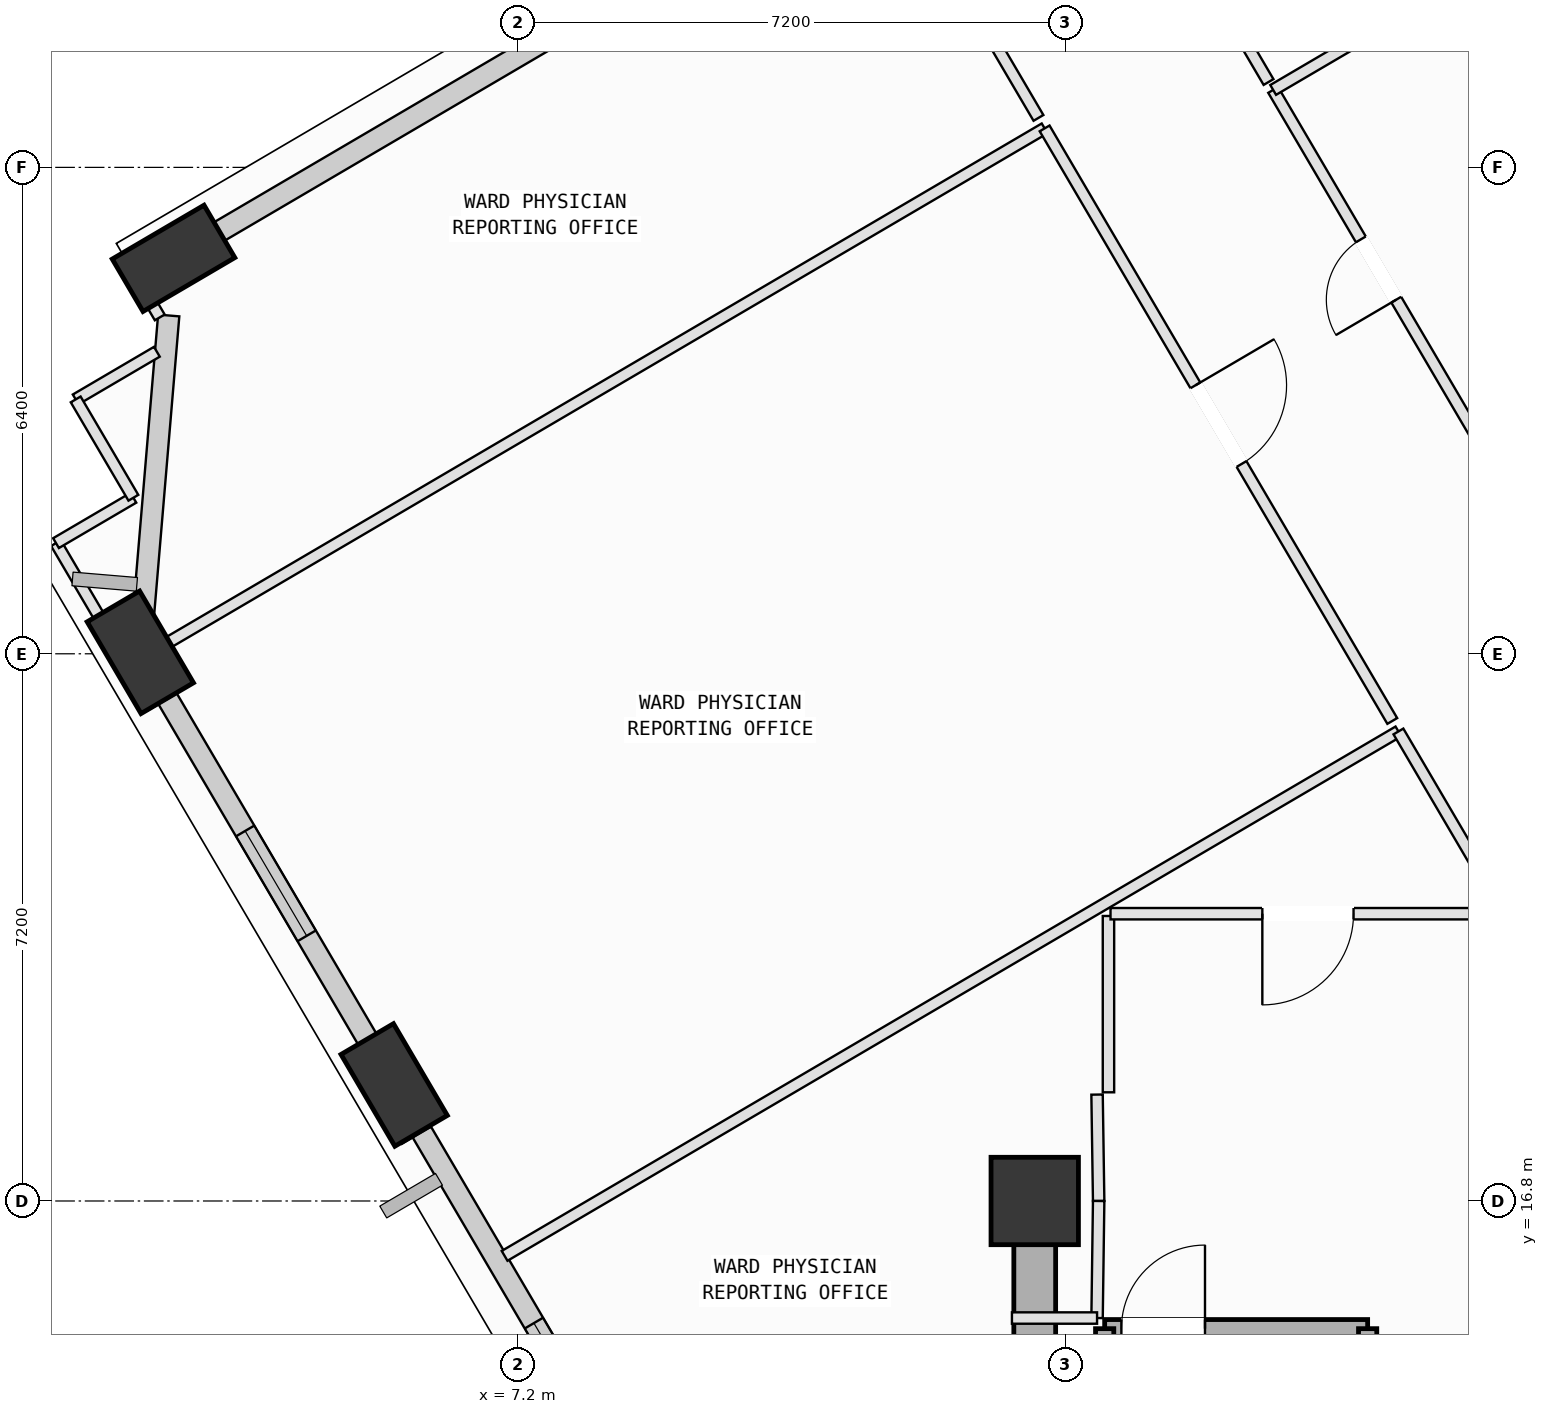
"""IFC4 building model, lengths in metres.
Left out: names, types, materials, properties, quantities, classifications, styles, units other than length and angle.
Written with IfcOpenShell. Run it as: python <this file> out.ifc"""

import sys

from ifc_helpers import new_model, si_unit, direction, frame, frame_2d, origin, origin_2d, place, context, subcontext, project, spatial, rectangle, extrude, element, fill, save


model = new_model("IFC4")
c1 = context("Model", 3, precision=1e-05, world=origin(), true_north=direction((0.0, 1.0)))
c2 = subcontext(c1, "Body", "Model", "MODEL_VIEW")
j1 = project(units=[si_unit("LENGTHUNIT", "METRE"), si_unit("PLANEANGLEUNIT", "RADIAN")], contexts=[c1])
p1 = place(None, origin())
s1 = spatial("IfcSite", under=j1, at=p1, CompositionType="ELEMENT")
p2 = place(p1, origin())
s2 = spatial("IfcBuilding", under=s1, at=p2, CompositionType="ELEMENT")
p3 = place(p2, frame((0.0, 0.0, 153.8)))
s3 = spatial("IfcBuildingStorey", under=s2, at=p3, CompositionType="ELEMENT", Elevation=153.8)
p4 = place(p3, frame((14.0, 16.8, 0.0), z_axis=(0.0, 0.0, 1.0), x_axis=(1.0, 0.0, 0.0)))
e1 = element("IfcColumn", 1, at=p4, inside=s3, PredefinedType="COLUMN", context=c2, shape_type="SweptSolid", body=[
    extrude(rectangle(XDim=1.15, YDim=1.15, at=origin_2d()), origin(), (0.0, 0.0, 1.0), 4.0),
])
p5 = place(p3, frame((2.669, 29.203, 0.002), z_axis=(-0.017085014726, -0.127289418228, 0.991718461197), x_axis=(0.921607394324, 0.382643519361, 0.064990367119)))
e2 = element("IfcColumn", 2, at=p5, inside=s3, PredefinedType="COLUMN", context=c2, shape_type="SweptSolid", body=[
    extrude(rectangle(XDim=1.4, YDim=0.8, at=origin_2d()), origin(), (0.0, 0.0, 1.0), 4.03),
])
p6 = place(p3, frame((2.232, 24.019, 0.002), z_axis=(0.004301232882, -0.128915824962, 0.991646211847), x_axis=(-0.534273545807, 0.837958489173, 0.111253533308)))
e3 = element("IfcColumn", 3, at=p6, inside=s3, PredefinedType="COLUMN", context=c2, shape_type="SweptSolid", body=[
    extrude(rectangle(XDim=1.4, YDim=0.8, at=origin_2d()), origin(), (0.0, 0.0, 1.0), 4.03),
])
p7 = place(p3, frame((5.572, 18.327, 0.002), z_axis=(0.027600932287, -0.115135317539, 0.992966287037), x_axis=(-0.69174719103, 0.714882822887, 0.102119406791)))
e4 = element("IfcColumn", 4, at=p7, inside=s3, PredefinedType="COLUMN", context=c2, shape_type="SweptSolid", body=[
    extrude(rectangle(XDim=1.4, YDim=0.8, at=origin_2d()), origin(), (0.0, 0.0, 1.0), 4.025),
])
p8 = place(p3, frame((2.922, 29.352, 0.0), z_axis=(0.0, 0.0, 1.0), x_axis=(0.862524124062, 0.506015943831, 0.0)))
e5 = element("IfcWall", 5, at=p8, inside=s3, PredefinedType="SOLIDWALL", context=c2, shape_type="SweptSolid", body=[
    extrude(rectangle(XDim=7.27, YDim=0.28, at=frame_2d((3.635, 0.0))), origin(), (0.0, 0.0, 1.0), 3.165),
])
p9 = place(p3, frame((2.252, 24.256, 0.0), z_axis=(0.0, 0.0, 1.0), x_axis=(0.083957153569, 0.996469365492, 0.0)))
e6 = element("IfcWall", 6, at=p9, inside=s3, PredefinedType="SOLIDWALL", context=c2, shape_type="SweptSolid", body=[
    extrude(rectangle(XDim=4.211, YDim=0.28, at=frame_2d((2.105, 0.0))), origin(), (0.0, 0.0, 1.0), 3.165),
])
p10 = place(p3, frame((5.439, 18.554, 0.0), z_axis=(0.0, 0.0, 1.0), x_axis=(-0.506043442112, 0.862507991091, 0.0)))
e7 = element("IfcWall", 7, at=p10, inside=s3, PredefinedType="SOLIDWALL", context=c2, shape_type="SweptSolid", body=[
    extrude(rectangle(XDim=5.628, YDim=0.28, at=frame_2d((2.814, 0.0))), origin(), (0.0, 0.0, 1.0), 3.165),
])
p11 = place(p10, frame((2.011, 0.0, 0.75)))
e8 = element("IfcOpeningElement", 8, at=p11, cuts=e7, PredefinedType="OPENING", context=c2, shape_type="SweptSolid", body=[
    extrude(rectangle(XDim=1.6, YDim=1.95, at=frame_2d((0.8, 0.975))), frame((0.0, 0.15, 0.0), z_axis=(0.0, -1.0, 0.0), x_axis=(1.0, 0.0, 0.0)), (0.0, 0.0, 1.0), 0.3),
])
p12 = place(p3, frame((8.802, 12.823, 0.0), z_axis=(0.0, 0.0, 1.0), x_axis=(-0.506043695411, 0.862507842477, 0.0)))
e9 = element("IfcWall", 9, at=p12, inside=s3, PredefinedType="SOLIDWALL", context=c2, shape_type="SweptSolid", body=[
    extrude(rectangle(XDim=5.662, YDim=0.28, at=frame_2d((2.831, 0.0))), origin(), (0.0, 0.0, 1.0), 3.165),
])
p13 = place(p12, frame((0.748, 0.0, 0.75)))
e10 = element("IfcOpeningElement", 10, at=p13, cuts=e9, PredefinedType="OPENING", context=c2, shape_type="SweptSolid", body=[
    extrude(rectangle(XDim=2.0, YDim=1.95, at=frame_2d((1.0, 0.975))), frame((0.0, 0.15, 0.0), z_axis=(0.0, -1.0, 0.0), x_axis=(1.0, 0.0, 0.0)), (0.0, 0.0, 1.0), 0.3),
])
p14 = place(p3, frame((14.92, 15.12, 0.0), z_axis=(0.0, 0.0, 1.0), x_axis=(1.0, 0.0, 0.0)))
e11 = element("IfcWall", 11, at=p14, inside=s3, PredefinedType="SOLIDWALL", context=c2, shape_type="SweptSolid", body=[
    extrude(rectangle(XDim=3.46, YDim=0.24, at=frame_2d((1.73, 0.0))), origin(), (0.0, 0.0, 1.0), 3.78),
])
p15 = place(p14, frame((0.22, 0.0, 0.0)))
e12 = element("IfcOpeningElement", 12, at=p15, cuts=e11, PredefinedType="OPENING", context=c2, shape_type="SweptSolid", body=[
    extrude(rectangle(XDim=1.1, YDim=2.15, at=frame_2d((0.55, 1.075))), frame((0.0, 0.13, 0.0), z_axis=(0.0, -1.0, 0.0), x_axis=(1.0, 0.0, 0.0)), (0.0, 0.0, 1.0), 0.26),
])
for number, where, z_axis, x_axis in (
    (13, (18.38, 15.12, 0.0), (0.0, 0.0, 1.0), (0.0, -1.0, 0.0)),
    (14, (14.92, 8.075, 0.0), (0.0, 0.0, 1.0), (0.0, 1.0, 0.0)),
):
    element("IfcWall", number, at=place(p3, frame(where, z_axis=z_axis, x_axis=x_axis)), inside=s3, PredefinedType="SOLIDWALL", context=c2, shape_type="SweptSolid", body=[
        extrude(rectangle(XDim=7.045, YDim=0.24, at=frame_2d((3.522, 0.0))), origin(), (0.0, 0.0, 1.0), 3.78),
    ])
p16 = place(p3, frame((14.0, 16.8, 0.0), z_axis=(0.0, 0.0, 1.0), x_axis=(0.0, -1.0, 0.0)))
e15 = element("IfcWall", 15, at=p16, inside=s3, PredefinedType="SHEAR", context=c2, shape_type="SweptSolid", body=[
    extrude(rectangle(XDim=9.0, YDim=0.55, at=frame_2d((4.5, 0.0))), origin(), (0.0, 0.0, 1.0), 3.78),
])
p17 = place(p3, frame((14.97, 20.55, 0.0), z_axis=(0.0, 0.0, 1.0), x_axis=(0.0, -1.0, 0.0)))
e16 = element("IfcWall", 16, at=p17, inside=s3, PredefinedType="PARTITIONING", context=c2, shape_type="SweptSolid", body=[
    extrude(rectangle(XDim=2.32, YDim=0.15, at=frame_2d((1.16, 0.0))), origin(), (0.0, 0.0, 1.0), 3.78),
])
p18 = place(p3, frame((14.82, 18.2, 0.0), z_axis=(0.0, 0.0, 1.0), x_axis=(0.01499656939, -0.99988754513, 0.0)))
e17 = element("IfcWall", 17, at=p18, inside=s3, PredefinedType="PARTITIONING", context=c2, shape_type="SweptSolid", body=[
    extrude(rectangle(XDim=1.4, YDim=0.15, at=frame_2d((0.7, 0.0))), origin(), (0.0, 0.0, 1.0), 3.78),
])
p19 = place(p3, frame((14.841, 16.8, 0.0), z_axis=(0.0, 0.0, 1.0), x_axis=(-0.01363221443, -0.999907077048, 0.0)))
e18 = element("IfcWall", 18, at=p19, inside=s3, PredefinedType="PARTITIONING", context=c2, shape_type="SweptSolid", body=[
    extrude(rectangle(XDim=1.54, YDim=0.15, at=frame_2d((0.77, 0.0))), origin(), (0.0, 0.0, 1.0), 3.78),
])
p20 = place(p3, frame((14.82, 15.26, 0.0), z_axis=(0.0, 0.0, 1.0), x_axis=(-1.0, 0.0, 0.0)))
e19 = element("IfcWall", 19, at=p20, inside=s3, PredefinedType="PARTITIONING", context=c2, shape_type="SweptSolid", body=[
    extrude(rectangle(XDim=1.12, YDim=0.15, at=frame_2d((0.56, 0.0))), origin(), (0.0, 0.0, 1.0), 3.78),
])
p21 = place(p3, frame((7.025, 16.078, 0.0), z_axis=(0.0, 0.0, 1.0), x_axis=(0.862494790815, 0.506065940186, 0.0)))
e20 = element("IfcWall", 20, at=p21, inside=s3, PredefinedType="PARTITIONING", context=c2, shape_type="SweptSolid", body=[
    extrude(rectangle(XDim=13.635, YDim=0.15, at=frame_2d((6.817, 0.0))), origin(), (0.0, 0.0, 1.0), 3.78),
])
p22 = place(p3, frame((18.785, 22.978, 0.0), z_axis=(0.0, 0.0, 1.0), x_axis=(0.506064259936, -0.862495776694, 0.0)))
e21 = element("IfcWall", 21, at=p22, inside=s3, PredefinedType="PARTITIONING", context=c2, shape_type="SweptSolid", body=[
    extrude(rectangle(XDim=2.78, YDim=0.15, at=frame_2d((1.39, 0.0))), origin(), (0.0, 0.0, 1.0), 3.78),
])
p23 = place(p3, frame((20.192, 20.58, 0.0), z_axis=(0.0, 0.0, 1.0), x_axis=(-1.0, 0.0, 0.0)))
e22 = element("IfcWall", 22, at=p23, inside=s3, PredefinedType="PARTITIONING", context=c2, shape_type="SweptSolid", body=[
    extrude(rectangle(XDim=5.195, YDim=0.15, at=frame_2d((2.597, 0.0))), origin(), (0.0, 0.0, 1.0), 3.78),
])
p24 = place(p23, frame((1.998, 0.0, 0.0)))
e23 = element("IfcOpeningElement", 23, at=p24, cuts=e22, PredefinedType="OPENING", context=c2, shape_type="SweptSolid", body=[
    extrude(rectangle(XDim=1.2, YDim=2.15, at=frame_2d((0.6, 1.075))), frame((0.0, 0.085, 0.0), z_axis=(0.0, -1.0, 0.0), x_axis=(1.0, 0.0, 0.0)), (0.0, 0.0, 1.0), 0.17),
])
p25 = place(p3, frame((2.072, 23.839, 0.0), z_axis=(0.0, 0.0, 1.0), x_axis=(0.862523991111, 0.506016170452, 0.0)))
e24 = element("IfcWall", 24, at=p25, inside=s3, PredefinedType="PARTITIONING", context=c2, shape_type="SweptSolid", body=[
    extrude(rectangle(XDim=13.98, YDim=0.15, at=frame_2d((6.99, 0.0))), origin(), (0.0, 0.0, 1.0), 3.78),
])
p26 = place(p3, frame((14.13, 30.913, 0.0), z_axis=(0.0, 0.0, 1.0), x_axis=(0.506007110353, -0.862529306327, 0.0)))
e25 = element("IfcWall", 25, at=p26, inside=s3, PredefinedType="PARTITIONING", context=c2, shape_type="SweptSolid", body=[
    extrude(rectangle(XDim=9.04, YDim=0.15, at=frame_2d((4.52, 0.0))), origin(), (0.0, 0.0, 1.0), 3.78),
])
p27 = place(p26, frame((3.92, 0.0, 0.0)))
e26 = element("IfcOpeningElement", 26, at=p27, cuts=e25, PredefinedType="OPENING", context=c2, shape_type="SweptSolid", body=[
    extrude(rectangle(XDim=1.2, YDim=2.15, at=frame_2d((0.6, 1.075))), frame((0.0, 0.085, 0.0), z_axis=(0.0, -1.0, 0.0), x_axis=(1.0, 0.0, 0.0)), (0.0, 0.0, 1.0), 0.17),
])
p28 = place(p3, frame((5.738, 17.59, 0.0), z_axis=(0.0, 0.0, 1.0), x_axis=(-0.506911529667, 0.861998086478, 0.0)))
e27 = element("IfcWall", 27, at=p28, inside=s3, PredefinedType="PARTITIONING", context=c2, shape_type="SweptSolid", body=[
    extrude(rectangle(XDim=0.982, YDim=0.15, at=frame_2d((0.491, 0.0))), origin(), (0.0, 0.0, 1.0), 3.165),
])
p29 = place(p3, frame((2.393, 23.292, 0.0), z_axis=(0.0, 0.0, 1.0), x_axis=(-0.506094778374, 0.862477869457, 0.0)))
e28 = element("IfcWall", 28, at=p29, inside=s3, PredefinedType="PARTITIONING", context=c2, shape_type="SweptSolid", body=[
    extrude(rectangle(XDim=0.634, YDim=0.15, at=frame_2d((0.317, 0.0))), origin(), (0.0, 0.0, 1.0), 3.165),
])
p30 = place(p3, frame((1.382, 27.347, 0.0), z_axis=(0.0, 0.0, 1.0), x_axis=(0.862273562312, 0.506442794142, 0.0)))
e29 = element("IfcWall", 29, at=p30, inside=s3, PredefinedType="PARTITIONING", context=c2, shape_type="SweptSolid", body=[
    extrude(rectangle(XDim=1.239, YDim=0.15, at=frame_2d((0.619, 0.0))), origin(), (0.0, 0.0, 1.0), 3.78),
])
p31 = place(p3, frame((2.488, 28.426, 0.0), z_axis=(0.0, 0.0, 1.0), x_axis=(-0.506179488708, 0.86242815655, 0.0)))
e30 = element("IfcWall", 30, at=p31, inside=s3, PredefinedType="PARTITIONING", context=c2, shape_type="SweptSolid", body=[
    extrude(rectangle(XDim=0.749, YDim=0.15, at=frame_2d((0.375, 0.0))), origin(), (0.0, 0.0, 1.0), 3.065),
])
p32 = place(p3, frame((2.109, 29.072, 0.0), z_axis=(0.0, 0.0, 1.0), x_axis=(0.862789487329, 0.505563349694, 0.0)))
e31 = element("IfcWall", 31, at=p32, inside=s3, PredefinedType="PARTITIONING", context=c2, shape_type="SweptSolid", body=[
    extrude(rectangle(XDim=0.843, YDim=0.15, at=frame_2d((0.421, 0.0))), origin(), (0.0, 0.0, 1.0), 3.78),
])
p33 = place(p3, frame((11.999, 34.544, 0.0), z_axis=(0.0, 0.0, 1.0), x_axis=(0.506174252811, -0.862431229601, 0.0)))
e32 = element("IfcWall", 32, at=p33, inside=s3, PredefinedType="PARTITIONING", context=c2, shape_type="SweptSolid", body=[
    extrude(rectangle(XDim=4.05, YDim=0.15, at=frame_2d((2.025, 0.0))), origin(), (0.0, 0.0, 1.0), 3.78),
])
p34 = place(p33, frame((1.7, 0.0, 0.0)))
e33 = element("IfcOpeningElement", 33, at=p34, cuts=e32, PredefinedType="OPENING", context=c2, shape_type="SweptSolid", body=[
    extrude(rectangle(XDim=1.2, YDim=2.15, at=frame_2d((0.6, 1.075))), frame((0.0, 0.085, 0.0), z_axis=(0.0, -1.0, 0.0), x_axis=(1.0, 0.0, 0.0)), (0.0, 0.0, 1.0), 0.17),
])
p35 = place(p3, frame((1.991, 23.977, 0.0), z_axis=(0.0, 0.0, 1.0), x_axis=(-0.506117697831, 0.862464420102, 0.0)))
e34 = element("IfcWall", 34, at=p35, inside=s3, PredefinedType="PARTITIONING", context=c2, shape_type="SweptSolid", body=[
    extrude(rectangle(XDim=1.715, YDim=0.15, at=frame_2d((0.857, 0.0))), origin(), (0.0, 0.0, 1.0), 3.78),
])
p36 = place(p3, frame((1.123, 25.456, 0.0), z_axis=(0.0, 0.0, 1.0), x_axis=(0.862651283186, 0.505799133667, 0.0)))
e35 = element("IfcWall", 35, at=p36, inside=s3, PredefinedType="PARTITIONING", context=c2, shape_type="SweptSolid", body=[
    extrude(rectangle(XDim=1.18, YDim=0.15, at=frame_2d((0.59, 0.0))), origin(), (0.0, 0.0, 1.0), 3.78),
])
p37 = place(p3, frame((2.141, 26.053, 0.0), z_axis=(0.0, 0.0, 1.0), x_axis=(-0.50597425282, 0.86254858152, 0.0)))
e36 = element("IfcWall", 36, at=p37, inside=s3, PredefinedType="PARTITIONING", context=c2, shape_type="SweptSolid", body=[
    extrude(rectangle(XDim=1.5, YDim=0.15, at=frame_2d((0.75, 0.0))), origin(), (0.0, 0.0, 1.0), 3.78),
])
p38 = place(p3, frame((19.91, 26.693, 0.0), z_axis=(0.0, 0.0, 1.0), x_axis=(-0.506077370403, 0.862488084072, 0.0)))
e37 = element("IfcWall", 37, at=p38, inside=s3, PredefinedType="PARTITIONING", context=c2, shape_type="SweptSolid", body=[
    extrude(rectangle(XDim=5.479, YDim=0.15, at=frame_2d((2.74, 0.0))), origin(), (0.0, 0.0, 1.0), 3.78),
])
p39 = place(p38, frame((2.28, 0.0, 0.0)))
e38 = element("IfcOpeningElement", 38, at=p39, cuts=e37, PredefinedType="OPENING", context=c2, shape_type="SweptSolid", body=[
    extrude(rectangle(XDim=0.92, YDim=2.1, at=frame_2d((0.46, 1.05))), frame((0.0, 0.085, 0.0), z_axis=(0.0, -1.0, 0.0), x_axis=(1.0, 0.0, 0.0)), (0.0, 0.0, 1.0), 0.17),
])
p40 = place(p3, frame((17.137, 31.419, 0.0), z_axis=(0.0, 0.0, 1.0), x_axis=(0.862476712349, 0.506096750292, 0.0)))
e39 = element("IfcWall", 39, at=p40, inside=s3, PredefinedType="PARTITIONING", context=c2, shape_type="SweptSolid", body=[
    extrude(rectangle(XDim=4.069, YDim=0.15, at=frame_2d((2.034, 0.0))), origin(), (0.0, 0.0, 1.0), 3.78),
])
p41 = place(p3, frame((17.076, 31.523, 0.0), z_axis=(0.0, 0.0, 1.0), x_axis=(-0.506089954955, 0.86248069978, 0.0)))
e40 = element("IfcWall", 40, at=p41, inside=s3, PredefinedType="PARTITIONING", context=c2, shape_type="SweptSolid", body=[
    extrude(rectangle(XDim=5.175, YDim=0.15, at=frame_2d((2.587, 0.0))), origin(), (0.0, 0.0, 1.0), 3.78),
])
p42 = place(p41, frame((2.127, 0.0, 0.0)))
e41 = element("IfcOpeningElement", 41, at=p42, cuts=e40, PredefinedType="OPENING", context=c2, shape_type="SweptSolid", body=[
    extrude(rectangle(XDim=0.92, YDim=2.1, at=frame_2d((0.46, 1.05))), frame((0.0, 0.085, 0.0), z_axis=(0.0, -1.0, 0.0), x_axis=(1.0, 0.0, 0.0)), (0.0, 0.0, 1.0), 0.17),
])
p43 = place(p11, origin())
e42 = element("IfcWindow", 42, at=p43, inside=s3, PartitioningType="SINGLE_PANEL", PredefinedType="WINDOW", context=c2, shape_type="SweptSolid", body=[
    extrude(rectangle(XDim=1.6, YDim=1.95, at=frame_2d((0.8, 0.975))), frame((0.0, 0.03, 0.0), z_axis=(0.0, -1.0, 0.0), x_axis=(1.0, 0.0, 0.0)), (0.0, 0.0, 1.0), 0.06),
])
fill(e8, e42)
p44 = place(p13, origin())
e43 = element("IfcWindow", 43, at=p44, inside=s3, PartitioningType="SINGLE_PANEL", PredefinedType="WINDOW", context=c2, shape_type="SweptSolid", body=[
    extrude(rectangle(XDim=2.0, YDim=1.95, at=frame_2d((1.0, 0.975))), frame((0.0, 0.03, 0.0), z_axis=(0.0, -1.0, 0.0), x_axis=(1.0, 0.0, 0.0)), (0.0, 0.0, 1.0), 0.06),
])
fill(e10, e43)
p45 = place(p15, origin())
e44 = element("IfcDoor", 44, at=p45, inside=s3, OperationType="SINGLE_SWING_RIGHT", PredefinedType="DOOR", context=c2, shape_type="SweptSolid", body=[
    extrude(rectangle(XDim=1.1, YDim=2.15, at=frame_2d((0.55, 1.075))), frame((0.0, 0.025, 0.0), z_axis=(0.0, -1.0, 0.0), x_axis=(1.0, 0.0, 0.0)), (0.0, 0.0, 1.0), 0.05),
])
fill(e12, e44)
p46 = place(p24, origin())
e45 = element("IfcDoor", 45, at=p46, inside=s3, OperationType="SINGLE_SWING_RIGHT", PredefinedType="DOOR", context=c2, shape_type="SweptSolid", body=[
    extrude(rectangle(XDim=1.2, YDim=2.15, at=frame_2d((0.6, 1.075))), frame((0.0, 0.025, 0.0), z_axis=(0.0, -1.0, 0.0), x_axis=(1.0, 0.0, 0.0)), (0.0, 0.0, 1.0), 0.05),
])
fill(e23, e45)
p47 = place(p27, origin())
e46 = element("IfcDoor", 46, at=p47, inside=s3, OperationType="SINGLE_SWING_LEFT", PredefinedType="DOOR", context=c2, shape_type="SweptSolid", body=[
    extrude(rectangle(XDim=1.2, YDim=2.15, at=frame_2d((0.6, 1.075))), frame((0.0, 0.025, 0.0), z_axis=(0.0, -1.0, 0.0), x_axis=(1.0, 0.0, 0.0)), (0.0, 0.0, 1.0), 0.05),
])
fill(e26, e46)
p48 = place(p39, origin())
e47 = element("IfcDoor", 47, at=p48, inside=s3, OperationType="SINGLE_SWING_LEFT", PredefinedType="DOOR", context=c2, shape_type="SweptSolid", body=[
    extrude(rectangle(XDim=0.92, YDim=2.1, at=frame_2d((0.46, 1.05))), frame((0.0, 0.025, 0.0), z_axis=(0.0, -1.0, 0.0), x_axis=(1.0, 0.0, 0.0)), (0.0, 0.0, 1.0), 0.05),
])
fill(e38, e47)
save(model, sys.argv[1])
